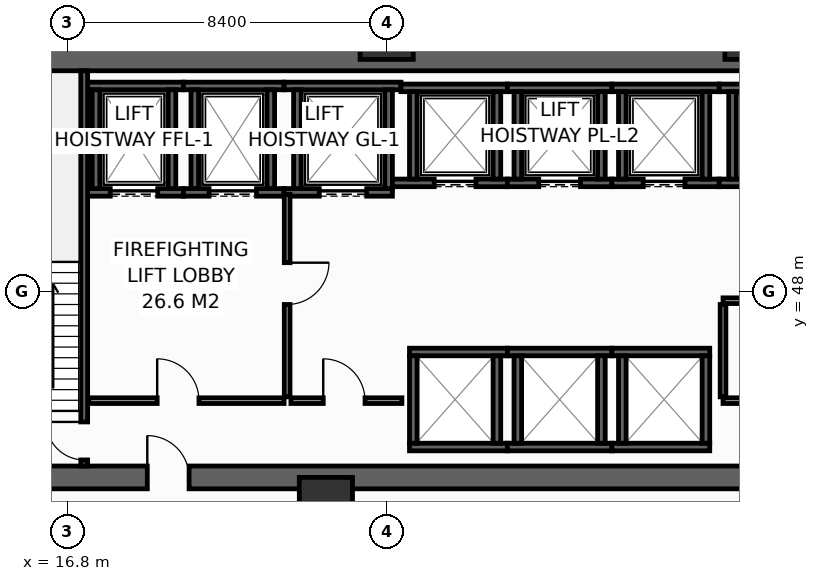
"""IFC4 building model, lengths in metres.
Left out: names, types, materials, properties, quantities, classifications, styles, units other than length and angle.
Written with IfcOpenShell. Run it as: python <this file> out.ifc"""

import sys

from ifc_helpers import new_model, si_unit, direction, frame, frame_2d, origin, origin_2d, place, context, subcontext, project, spatial, rectangle, hollow_rectangle, extrude, element, fill, save


model = new_model("IFC4")
c1 = context("Model", 3, precision=1e-05, world=origin(), true_north=direction((0.0, 1.0)))
c2 = subcontext(c1, "Body", "Model", "MODEL_VIEW")
j1 = project(units=[si_unit("LENGTHUNIT", "METRE"), si_unit("PLANEANGLEUNIT", "RADIAN")], contexts=[c1])
p1 = place(None, origin())
s1 = spatial("IfcSite", under=j1, at=p1, CompositionType="ELEMENT")
p2 = place(p1, origin())
s2 = spatial("IfcBuilding", under=s1, at=p2, CompositionType="ELEMENT")
p3 = place(p2, frame((0.0, 0.0, 6.0)))
s3 = spatial("IfcBuildingStorey", under=s2, at=p3, CompositionType="ELEMENT", Elevation=6.0)
p4 = place(p3, frame((13.5, 43.1, 0.0), z_axis=(0.0, 0.0, 1.0), x_axis=(1.0, 0.0, 0.0)))
e1 = element("IfcWall", 1, at=p4, inside=s3, PredefinedType="SHEAR", context=c2, shape_type="SweptSolid", body=[
    extrude(rectangle(XDim=32.9, YDim=0.6, at=frame_2d((16.45, 0.0))), origin(), (0.0, 0.0, 1.0), 5.1),
])
p5 = place(p4, frame((5.4, 0.0, 0.0)))
e2 = element("IfcOpeningElement", 2, at=p5, cuts=e1, PredefinedType="OPENING", context=c2, shape_type="SweptSolid", body=[
    extrude(rectangle(XDim=1.1, YDim=2.15, at=frame_2d((0.55, 1.075))), frame((0.0, 0.31, 0.0), z_axis=(0.0, -1.0, 0.0), x_axis=(1.0, 0.0, 0.0)), (0.0, 0.0, 1.0), 0.62),
])
p6 = place(p4, frame((25.6, 0.0, 0.0)))
e3 = element("IfcOpeningElement", 3, at=p6, cuts=e1, PredefinedType="OPENING", context=c2, shape_type="SweptSolid", body=[
    extrude(rectangle(XDim=1.1, YDim=2.15, at=frame_2d((0.55, 1.075))), frame((0.0, 0.31, 0.0), z_axis=(0.0, -1.0, 0.0), x_axis=(1.0, 0.0, 0.0)), (0.0, 0.0, 1.0), 0.62),
])
p7 = place(p3, frame((13.5, 54.1, 0.0), z_axis=(0.0, 0.0, 1.0), x_axis=(1.0, 0.0, 0.0)))
e4 = element("IfcWall", 4, at=p7, inside=s3, PredefinedType="SHEAR", context=c2, shape_type="SweptSolid", body=[
    extrude(rectangle(XDim=32.9, YDim=0.6, at=frame_2d((16.45, 0.0))), origin(), (0.0, 0.0, 1.0), 5.1),
])
for number, where, z_axis, x_axis in (
    (5, (25.2, 54.8, 0.0), (0.0, 0.0, 1.0), (1.0, 0.0, 0.0)),
    (6, (34.8, 54.8, 0.0), (0.0, 0.0, 1.0), (1.0, 0.0, 0.0)),
    (7, (23.6, 42.4, 0.0), (0.0, 0.0, 1.0), (1.0, 0.0, 0.0)),
):
    element("IfcColumn", number, at=place(p3, frame(where, z_axis=z_axis, x_axis=x_axis)), inside=s3, PredefinedType="COLUMN", context=c2, shape_type="SweptSolid", body=[
        extrude(hollow_rectangle(XDim=1.4, YDim=1.4, WallThickness=0.065, at=origin_2d()), origin(), (0.0, 0.0, 1.0), 5.4),
    ])
p8 = place(p3, frame((17.33, 50.6, 0.0), z_axis=(0.0, 0.0, 1.0), x_axis=(1.0, 0.0, 0.0)))
e8 = element("IfcWall", 8, at=p8, inside=s3, PredefinedType="SHEAR", context=c2, shape_type="SweptSolid", body=[
    extrude(rectangle(XDim=2.52, YDim=0.2, at=frame_2d((1.26, 0.0))), origin(), (0.0, 0.0, 1.0), 5.1),
])
p9 = place(p8, frame((0.595, 0.0, 0.0)))
e9 = element("IfcOpeningElement", 9, at=p9, cuts=e8, PredefinedType="OPENING", context=c2, shape_type="SweptSolid", body=[
    extrude(rectangle(XDim=1.25, YDim=2.3, at=frame_2d((0.625, 1.15))), frame((0.0, 0.11, 0.0), z_axis=(0.0, -1.0, 0.0), x_axis=(1.0, 0.0, 0.0)), (0.0, 0.0, 1.0), 0.22),
])
p10 = place(p3, frame((17.33, 53.4, 0.0), z_axis=(0.0, 0.0, 1.0), x_axis=(1.0, 0.0, 0.0)))
e10 = element("IfcWall", 10, at=p10, inside=s3, PredefinedType="SHEAR", context=c2, shape_type="SweptSolid", body=[
    extrude(rectangle(XDim=2.52, YDim=0.2, at=frame_2d((1.26, 0.0))), origin(), (0.0, 0.0, 1.0), 5.1),
])
for number, where, z_axis, x_axis in (
    (11, (17.55, 50.7, 0.0), (0.0, 0.0, 1.0), (0.0, 1.0, 0.0)),
    (12, (19.55, 50.7, 0.0), (0.0, 0.0, 1.0), (0.0, 1.0, 0.0)),
):
    element("IfcWall", number, at=place(p3, frame(where, z_axis=z_axis, x_axis=x_axis)), inside=s3, PredefinedType="SHEAR", context=c2, shape_type="SweptSolid", body=[
        extrude(rectangle(XDim=2.6, YDim=0.2, at=frame_2d((1.3, 0.0))), origin(), (0.0, 0.0, 1.0), 5.1),
    ])
p11 = place(p3, frame((19.85, 50.6, 0.0), z_axis=(0.0, 0.0, 1.0), x_axis=(1.0, 0.0, 0.0)))
e13 = element("IfcWall", 13, at=p11, inside=s3, PredefinedType="SHEAR", context=c2, shape_type="SweptSolid", body=[
    extrude(rectangle(XDim=2.65, YDim=0.2, at=frame_2d((1.325, 0.0))), origin(), (0.0, 0.0, 1.0), 5.1),
])
p12 = place(p11, frame((0.675, 0.0, 0.0)))
e14 = element("IfcOpeningElement", 14, at=p12, cuts=e13, PredefinedType="OPENING", context=c2, shape_type="SweptSolid", body=[
    extrude(rectangle(XDim=1.25, YDim=2.3, at=frame_2d((0.625, 1.15))), frame((0.0, 0.11, 0.0), z_axis=(0.0, -1.0, 0.0), x_axis=(1.0, 0.0, 0.0)), (0.0, 0.0, 1.0), 0.22),
])
p13 = place(p3, frame((19.85, 53.4, 0.0), z_axis=(0.0, 0.0, 1.0), x_axis=(1.0, 0.0, 0.0)))
e15 = element("IfcWall", 15, at=p13, inside=s3, PredefinedType="SHEAR", context=c2, shape_type="SweptSolid", body=[
    extrude(rectangle(XDim=2.65, YDim=0.2, at=frame_2d((1.325, 0.0))), origin(), (0.0, 0.0, 1.0), 5.1),
])
for number, where, z_axis, x_axis in (
    (16, (20.15, 50.7, 0.0), (0.0, 0.0, 1.0), (0.0, 1.0, 0.0)),
    (17, (22.15, 50.7, 0.0), (0.0, 0.0, 1.0), (0.0, 1.0, 0.0)),
):
    element("IfcWall", number, at=place(p3, frame(where, z_axis=z_axis, x_axis=x_axis)), inside=s3, PredefinedType="SHEAR", context=c2, shape_type="SweptSolid", body=[
        extrude(rectangle(XDim=2.6, YDim=0.2, at=frame_2d((1.3, 0.0))), origin(), (0.0, 0.0, 1.0), 5.1),
    ])
p14 = place(p3, frame((22.5, 50.6, 0.0), z_axis=(0.0, 0.0, 1.0), x_axis=(1.0, 0.0, 0.0)))
e18 = element("IfcWall", 18, at=p14, inside=s3, PredefinedType="SHEAR", context=c2, shape_type="SweptSolid", body=[
    extrude(rectangle(XDim=2.85, YDim=0.2, at=frame_2d((1.425, 0.0))), origin(), (0.0, 0.0, 1.0), 5.1),
])
p15 = place(p14, frame((0.925, 0.0, 0.0)))
e19 = element("IfcOpeningElement", 19, at=p15, cuts=e18, PredefinedType="OPENING", context=c2, shape_type="SweptSolid", body=[
    extrude(rectangle(XDim=1.25, YDim=2.3, at=frame_2d((0.625, 1.15))), frame((0.0, 0.11, 0.0), z_axis=(0.0, -1.0, 0.0), x_axis=(1.0, 0.0, 0.0)), (0.0, 0.0, 1.0), 0.22),
])
p16 = place(p3, frame((22.5, 53.4, 0.0), z_axis=(0.0, 0.0, 1.0), x_axis=(1.0, 0.0, 0.0)))
e20 = element("IfcWall", 20, at=p16, inside=s3, PredefinedType="SHEAR", context=c2, shape_type="SweptSolid", body=[
    extrude(rectangle(XDim=3.075, YDim=0.2, at=frame_2d((1.538, 0.0))), origin(), (0.0, 0.0, 1.0), 5.1),
])
for number, where, z_axis, x_axis in (
    (21, (22.85, 50.7, 0.0), (0.0, 0.0, 1.0), (0.0, 1.0, 0.0)),
    (22, (25.25, 50.7, 0.0), (0.0, 0.0, 1.0), (0.0, 1.0, 0.0)),
):
    element("IfcWall", number, at=place(p3, frame(where, z_axis=z_axis, x_axis=x_axis)), inside=s3, PredefinedType="SHEAR", context=c2, shape_type="SweptSolid", body=[
        extrude(rectangle(XDim=2.6, YDim=0.2, at=frame_2d((1.3, 0.0))), origin(), (0.0, 0.0, 1.0), 5.1),
    ])
p17 = place(p3, frame((25.35, 50.85, 0.0), z_axis=(0.0, 0.0, 1.0), x_axis=(1.0, 0.0, 0.0)))
e23 = element("IfcWall", 23, at=p17, inside=s3, PredefinedType="SHEAR", context=c2, shape_type="SweptSolid", body=[
    extrude(rectangle(XDim=3.025, YDim=0.2, at=frame_2d((1.512, 0.0))), origin(), (0.0, 0.0, 1.0), 5.1),
])
p18 = place(p17, frame((1.1, 0.0, 0.0)))
e24 = element("IfcOpeningElement", 24, at=p18, cuts=e23, PredefinedType="OPENING", context=c2, shape_type="SweptSolid", body=[
    extrude(rectangle(XDim=1.1, YDim=2.2, at=frame_2d((0.55, 1.1))), frame((0.0, 0.11, 0.0), z_axis=(0.0, -1.0, 0.0), x_axis=(1.0, 0.0, 0.0)), (0.0, 0.0, 1.0), 0.22),
])
p19 = place(p3, frame((25.575, 53.35, 0.0), z_axis=(0.0, 0.0, 1.0), x_axis=(1.0, 0.0, 0.0)))
e25 = element("IfcWall", 25, at=p19, inside=s3, PredefinedType="SHEAR", context=c2, shape_type="SweptSolid", body=[
    extrude(rectangle(XDim=2.8, YDim=0.2, at=frame_2d((1.4, 0.0))), origin(), (0.0, 0.0, 1.0), 5.1),
])
for number, where, z_axis, x_axis in (
    (26, (25.9, 50.95, 0.0), (0.0, 0.0, 1.0), (0.0, 1.0, 0.0)),
    (27, (28.1, 50.95, 0.0), (0.0, 0.0, 1.0), (0.0, 1.0, 0.0)),
):
    element("IfcWall", number, at=place(p3, frame(where, z_axis=z_axis, x_axis=x_axis)), inside=s3, PredefinedType="SHEAR", context=c2, shape_type="SweptSolid", body=[
        extrude(rectangle(XDim=2.3, YDim=0.2, at=frame_2d((1.15, 0.0))), origin(), (0.0, 0.0, 1.0), 5.1),
    ])
p20 = place(p3, frame((28.375, 50.85, 0.0), z_axis=(0.0, 0.0, 1.0), x_axis=(1.0, 0.0, 0.0)))
e28 = element("IfcWall", 28, at=p20, inside=s3, PredefinedType="SHEAR", context=c2, shape_type="SweptSolid", body=[
    extrude(rectangle(XDim=2.75, YDim=0.2, at=frame_2d((1.375, 0.0))), origin(), (0.0, 0.0, 1.0), 5.1),
])
p21 = place(p20, frame((0.825, 0.0, 0.0)))
e29 = element("IfcOpeningElement", 29, at=p21, cuts=e28, PredefinedType="OPENING", context=c2, shape_type="SweptSolid", body=[
    extrude(rectangle(XDim=1.1, YDim=2.2, at=frame_2d((0.55, 1.1))), frame((0.0, 0.11, 0.0), z_axis=(0.0, -1.0, 0.0), x_axis=(1.0, 0.0, 0.0)), (0.0, 0.0, 1.0), 0.22),
])
p22 = place(p3, frame((28.375, 53.35, 0.0), z_axis=(0.0, 0.0, 1.0), x_axis=(1.0, 0.0, 0.0)))
e30 = element("IfcWall", 30, at=p22, inside=s3, PredefinedType="SHEAR", context=c2, shape_type="SweptSolid", body=[
    extrude(rectangle(XDim=2.75, YDim=0.2, at=frame_2d((1.375, 0.0))), origin(), (0.0, 0.0, 1.0), 5.1),
])
for number, where, z_axis, x_axis in (
    (31, (28.65, 50.95, 0.0), (0.0, 0.0, 1.0), (0.0, 1.0, 0.0)),
    (32, (30.85, 50.95, 0.0), (0.0, 0.0, 1.0), (0.0, 1.0, 0.0)),
):
    element("IfcWall", number, at=place(p3, frame(where, z_axis=z_axis, x_axis=x_axis)), inside=s3, PredefinedType="SHEAR", context=c2, shape_type="SweptSolid", body=[
        extrude(rectangle(XDim=2.3, YDim=0.2, at=frame_2d((1.15, 0.0))), origin(), (0.0, 0.0, 1.0), 5.1),
    ])
p23 = place(p3, frame((31.125, 50.85, 0.0), z_axis=(0.0, 0.0, 1.0), x_axis=(1.0, 0.0, 0.0)))
e33 = element("IfcWall", 33, at=p23, inside=s3, PredefinedType="SHEAR", context=c2, shape_type="SweptSolid", body=[
    extrude(rectangle(XDim=2.825, YDim=0.2, at=frame_2d((1.413, 0.0))), origin(), (0.0, 0.0, 1.0), 5.1),
])
p24 = place(p23, frame((0.825, 0.0, 0.0)))
e34 = element("IfcOpeningElement", 34, at=p24, cuts=e33, PredefinedType="OPENING", context=c2, shape_type="SweptSolid", body=[
    extrude(rectangle(XDim=1.1, YDim=2.2, at=frame_2d((0.55, 1.1))), frame((0.0, 0.11, 0.0), z_axis=(0.0, -1.0, 0.0), x_axis=(1.0, 0.0, 0.0)), (0.0, 0.0, 1.0), 0.22),
])
p25 = place(p3, frame((31.125, 53.35, 0.0), z_axis=(0.0, 0.0, 1.0), x_axis=(1.0, 0.0, 0.0)))
e35 = element("IfcWall", 35, at=p25, inside=s3, PredefinedType="SHEAR", context=c2, shape_type="SweptSolid", body=[
    extrude(rectangle(XDim=2.825, YDim=0.2, at=frame_2d((1.413, 0.0))), origin(), (0.0, 0.0, 1.0), 5.1),
])
for number, where, z_axis, x_axis in (
    (36, (31.4, 50.95, 0.0), (0.0, 0.0, 1.0), (0.0, 1.0, 0.0)),
    (37, (33.6, 50.95, 0.0), (0.0, 0.0, 1.0), (0.0, 1.0, 0.0)),
):
    element("IfcWall", number, at=place(p3, frame(where, z_axis=z_axis, x_axis=x_axis)), inside=s3, PredefinedType="SHEAR", context=c2, shape_type="SweptSolid", body=[
        extrude(rectangle(XDim=2.3, YDim=0.2, at=frame_2d((1.15, 0.0))), origin(), (0.0, 0.0, 1.0), 5.1),
    ])
for number, where, z_axis, x_axis in (
    (38, (25.8, 43.9, 0.0), (0.0, 0.0, 1.0), (1.0, 0.0, 0.0)),
    (39, (25.8, 46.4, 0.0), (0.0, 0.0, 1.0), (1.0, 0.0, 0.0)),
):
    element("IfcWall", number, at=place(p3, frame(where, z_axis=z_axis, x_axis=x_axis)), inside=s3, PredefinedType="SHEAR", context=c2, shape_type="SweptSolid", body=[
        extrude(rectangle(XDim=2.575, YDim=0.2, at=frame_2d((1.288, 0.0))), origin(), (0.0, 0.0, 1.0), 5.1),
    ])
for number, where, z_axis, x_axis in (
    (40, (25.9, 44.0, 0.0), (0.0, 0.0, 1.0), (0.0, 1.0, 0.0)),
    (41, (28.1, 44.0, 0.0), (0.0, 0.0, 1.0), (0.0, 1.0, 0.0)),
):
    element("IfcWall", number, at=place(p3, frame(where, z_axis=z_axis, x_axis=x_axis)), inside=s3, PredefinedType="SHEAR", context=c2, shape_type="SweptSolid", body=[
        extrude(rectangle(XDim=2.3, YDim=0.2, at=frame_2d((1.15, 0.0))), origin(), (0.0, 0.0, 1.0), 5.1),
    ])
for number, where, z_axis, x_axis in (
    (42, (28.375, 43.9, 0.0), (0.0, 0.0, 1.0), (1.0, 0.0, 0.0)),
    (43, (28.375, 46.4, 0.0), (0.0, 0.0, 1.0), (1.0, 0.0, 0.0)),
):
    element("IfcWall", number, at=place(p3, frame(where, z_axis=z_axis, x_axis=x_axis)), inside=s3, PredefinedType="SHEAR", context=c2, shape_type="SweptSolid", body=[
        extrude(rectangle(XDim=2.75, YDim=0.2, at=frame_2d((1.375, 0.0))), origin(), (0.0, 0.0, 1.0), 5.1),
    ])
for number, where, z_axis, x_axis in (
    (44, (28.65, 44.0, 0.0), (0.0, 0.0, 1.0), (0.0, 1.0, 0.0)),
    (45, (30.85, 44.0, 0.0), (0.0, 0.0, 1.0), (0.0, 1.0, 0.0)),
):
    element("IfcWall", number, at=place(p3, frame(where, z_axis=z_axis, x_axis=x_axis)), inside=s3, PredefinedType="SHEAR", context=c2, shape_type="SweptSolid", body=[
        extrude(rectangle(XDim=2.3, YDim=0.2, at=frame_2d((1.15, 0.0))), origin(), (0.0, 0.0, 1.0), 5.1),
    ])
for number, where, z_axis, x_axis in (
    (46, (31.125, 43.9, 0.0), (0.0, 0.0, 1.0), (1.0, 0.0, 0.0)),
    (47, (31.125, 46.4, 0.0), (0.0, 0.0, 1.0), (1.0, 0.0, 0.0)),
):
    element("IfcWall", number, at=place(p3, frame(where, z_axis=z_axis, x_axis=x_axis)), inside=s3, PredefinedType="SHEAR", context=c2, shape_type="SweptSolid", body=[
        extrude(rectangle(XDim=2.575, YDim=0.2, at=frame_2d((1.288, 0.0))), origin(), (0.0, 0.0, 1.0), 5.1),
    ])
for number, where, z_axis, x_axis in (
    (48, (31.4, 44.0, 0.0), (0.0, 0.0, 1.0), (0.0, 1.0, 0.0)),
    (49, (33.6, 44.0, 0.0), (0.0, 0.0, 1.0), (0.0, 1.0, 0.0)),
):
    element("IfcWall", number, at=place(p3, frame(where, z_axis=z_axis, x_axis=x_axis)), inside=s3, PredefinedType="SHEAR", context=c2, shape_type="SweptSolid", body=[
        extrude(rectangle(XDim=2.3, YDim=0.2, at=frame_2d((1.15, 0.0))), origin(), (0.0, 0.0, 1.0), 5.1),
    ])
for number, where, z_axis, x_axis in (
    (50, (33.95, 50.85, 0.0), (0.0, 0.0, 1.0), (1.0, 0.0, 0.0)),
    (51, (33.95, 53.35, 0.0), (0.0, 0.0, 1.0), (1.0, 0.0, 0.0)),
):
    element("IfcWall", number, at=place(p3, frame(where, z_axis=z_axis, x_axis=x_axis)), inside=s3, PredefinedType="SHEAR", context=c2, shape_type="SweptSolid", body=[
        extrude(rectangle(XDim=2.825, YDim=0.2, at=frame_2d((1.413, 0.0))), origin(), (0.0, 0.0, 1.0), 5.1),
    ])
p26 = place(p3, frame((34.3, 50.95, 0.0), z_axis=(0.0, 0.0, 1.0), x_axis=(0.0, 1.0, 0.0)))
e52 = element("IfcWall", 52, at=p26, inside=s3, PredefinedType="SHEAR", context=c2, shape_type="SweptSolid", body=[
    extrude(rectangle(XDim=2.3, YDim=0.2, at=frame_2d((1.15, 0.0))), origin(), (0.0, 0.0, 1.0), 5.1),
])
p27 = place(p3, frame((17.24, 43.4, 0.0), z_axis=(0.0, 0.0, 1.0), x_axis=(0.0, 1.0, 0.0)))
e53 = element("IfcWall", 53, at=p27, inside=s3, PredefinedType="SHEAR", context=c2, shape_type="SweptSolid", body=[
    extrude(rectangle(XDim=10.4, YDim=0.18, at=frame_2d((5.2, 0.0))), origin(), (0.0, 0.0, 1.0), 5.1),
])
p28 = place(p27, frame((0.16, 0.0, 0.0)))
e54 = element("IfcOpeningElement", 54, at=p28, cuts=e53, PredefinedType="OPENING", context=c2, shape_type="SweptSolid", body=[
    extrude(rectangle(XDim=1.0, YDim=2.15, at=frame_2d((0.5, 1.075))), frame((0.0, 0.1, 0.0), z_axis=(0.0, -1.0, 0.0), x_axis=(1.0, 0.0, 0.0)), (0.0, 0.0, 1.0), 0.2),
])
p29 = place(p3, frame((17.36, 45.12, 0.0), z_axis=(0.0, 0.0, 1.0), x_axis=(1.0, 0.0, 0.0)))
e55 = element("IfcWall", 55, at=p29, inside=s3, PredefinedType="PARTITIONING", context=c2, shape_type="SweptSolid", body=[
    extrude(rectangle(XDim=5.14, YDim=0.15, at=frame_2d((2.57, 0.0))), origin(), (0.0, 0.0, 1.0), 5.1),
])
p30 = place(p29, frame((1.8, 0.0, 0.0)))
e56 = element("IfcOpeningElement", 56, at=p30, cuts=e55, PredefinedType="OPENING", context=c2, shape_type="SweptSolid", body=[
    extrude(rectangle(XDim=1.1, YDim=2.15, at=frame_2d((0.55, 1.075))), frame((0.0, 0.085, 0.0), z_axis=(0.0, -1.0, 0.0), x_axis=(1.0, 0.0, 0.0)), (0.0, 0.0, 1.0), 0.17),
])
p31 = place(p3, frame((22.58, 50.55, 0.0), z_axis=(0.0, 0.0, 1.0), x_axis=(0.0, -1.0, 0.0)))
e57 = element("IfcWall", 57, at=p31, inside=s3, PredefinedType="PARTITIONING", context=c2, shape_type="SweptSolid", body=[
    extrude(rectangle(XDim=5.33, YDim=0.15, at=frame_2d((2.665, 0.0))), origin(), (0.0, 0.0, 1.0), 5.1),
])
p32 = place(p31, frame((1.8, 0.0, 0.0)))
e58 = element("IfcOpeningElement", 58, at=p32, cuts=e57, PredefinedType="OPENING", context=c2, shape_type="SweptSolid", body=[
    extrude(rectangle(XDim=1.1, YDim=2.15, at=frame_2d((0.55, 1.075))), frame((0.0, 0.085, 0.0), z_axis=(0.0, -1.0, 0.0), x_axis=(1.0, 0.0, 0.0)), (0.0, 0.0, 1.0), 0.17),
])
p33 = place(p3, frame((22.68, 45.12, 0.0), z_axis=(0.0, 0.0, 1.0), x_axis=(1.0, 0.0, 0.0)))
e59 = element("IfcWall", 59, at=p33, inside=s3, PredefinedType="PARTITIONING", context=c2, shape_type="SweptSolid", body=[
    extrude(rectangle(XDim=2.92, YDim=0.15, at=frame_2d((1.46, 0.0))), origin(), (0.0, 0.0, 1.0), 5.1),
])
p34 = place(p33, frame((0.85, 0.0, 0.0)))
e60 = element("IfcOpeningElement", 60, at=p34, cuts=e59, PredefinedType="OPENING", context=c2, shape_type="SweptSolid", body=[
    extrude(rectangle(XDim=1.1, YDim=2.15, at=frame_2d((0.55, 1.075))), frame((0.0, 0.085, 0.0), z_axis=(0.0, -1.0, 0.0), x_axis=(1.0, 0.0, 0.0)), (0.0, 0.0, 1.0), 0.17),
])
p35 = place(p3, frame((34.05, 45.12, 0.0), z_axis=(0.0, 0.0, 1.0), x_axis=(1.0, 0.0, 0.0)))
e61 = element("IfcWall", 61, at=p35, inside=s3, PredefinedType="PARTITIONING", context=c2, shape_type="SweptSolid", body=[
    extrude(rectangle(XDim=8.45, YDim=0.15, at=frame_2d((4.225, 0.0))), origin(), (0.0, 0.0, 1.0), 5.1),
])
p36 = place(p35, frame((3.6, 0.0, 0.0)))
e62 = element("IfcOpeningElement", 62, at=p36, cuts=e61, PredefinedType="OPENING", context=c2, shape_type="SweptSolid", body=[
    extrude(rectangle(XDim=0.95, YDim=2.15, at=frame_2d((0.475, 1.075))), frame((0.0, 0.085, 0.0), z_axis=(0.0, -1.0, 0.0), x_axis=(1.0, 0.0, 0.0)), (0.0, 0.0, 1.0), 0.17),
])
p37 = place(p3, frame((34.05, 47.75, 0.0), z_axis=(0.0, 0.0, 1.0), x_axis=(1.0, 0.0, 0.0)))
e63 = element("IfcWall", 63, at=p37, inside=s3, PredefinedType="PARTITIONING", context=c2, shape_type="SweptSolid", body=[
    extrude(rectangle(XDim=8.45, YDim=0.15, at=frame_2d((4.225, 0.0))), origin(), (0.0, 0.0, 1.0), 5.1),
])
p38 = place(p3, frame((34.05, 45.22, 0.0), z_axis=(0.0, 0.0, 1.0), x_axis=(0.0, 1.0, 0.0)))
e64 = element("IfcWall", 64, at=p38, inside=s3, PredefinedType="PARTITIONING", context=c2, shape_type="SweptSolid", body=[
    extrude(rectangle(XDim=2.43, YDim=0.15, at=frame_2d((1.215, 0.0))), origin(), (0.0, 0.0, 1.0), 5.1),
])
p39 = place(p9, origin())
e65 = element("IfcDoor", 65, at=p39, inside=s3, OperationType="SLIDING_TO_LEFT", PredefinedType="DOOR", context=c2, shape_type="SweptSolid", body=[
    extrude(rectangle(XDim=1.25, YDim=2.3, at=frame_2d((0.625, 1.15))), frame((0.0, 0.025, 0.0), z_axis=(0.0, -1.0, 0.0), x_axis=(1.0, 0.0, 0.0)), (0.0, 0.0, 1.0), 0.05),
])
fill(e9, e65)
p40 = place(p12, origin())
e66 = element("IfcDoor", 66, at=p40, inside=s3, OperationType="SLIDING_TO_LEFT", PredefinedType="DOOR", context=c2, shape_type="SweptSolid", body=[
    extrude(rectangle(XDim=1.25, YDim=2.3, at=frame_2d((0.625, 1.15))), frame((0.0, 0.025, 0.0), z_axis=(0.0, -1.0, 0.0), x_axis=(1.0, 0.0, 0.0)), (0.0, 0.0, 1.0), 0.05),
])
fill(e14, e66)
p41 = place(p15, origin())
e67 = element("IfcDoor", 67, at=p41, inside=s3, OperationType="SLIDING_TO_LEFT", PredefinedType="DOOR", context=c2, shape_type="SweptSolid", body=[
    extrude(rectangle(XDim=1.25, YDim=2.3, at=frame_2d((0.625, 1.15))), frame((0.0, 0.025, 0.0), z_axis=(0.0, -1.0, 0.0), x_axis=(1.0, 0.0, 0.0)), (0.0, 0.0, 1.0), 0.05),
])
fill(e19, e67)
p42 = place(p18, origin())
e68 = element("IfcDoor", 68, at=p42, inside=s3, OperationType="SLIDING_TO_LEFT", PredefinedType="DOOR", context=c2, shape_type="SweptSolid", body=[
    extrude(rectangle(XDim=1.1, YDim=2.2, at=frame_2d((0.55, 1.1))), frame((0.0, 0.025, 0.0), z_axis=(0.0, -1.0, 0.0), x_axis=(1.0, 0.0, 0.0)), (0.0, 0.0, 1.0), 0.05),
])
fill(e24, e68)
p43 = place(p21, origin())
e69 = element("IfcDoor", 69, at=p43, inside=s3, OperationType="SLIDING_TO_LEFT", PredefinedType="DOOR", context=c2, shape_type="SweptSolid", body=[
    extrude(rectangle(XDim=1.1, YDim=2.2, at=frame_2d((0.55, 1.1))), frame((0.0, 0.025, 0.0), z_axis=(0.0, -1.0, 0.0), x_axis=(1.0, 0.0, 0.0)), (0.0, 0.0, 1.0), 0.05),
])
fill(e29, e69)
p44 = place(p24, origin())
e70 = element("IfcDoor", 70, at=p44, inside=s3, OperationType="SLIDING_TO_LEFT", PredefinedType="DOOR", context=c2, shape_type="SweptSolid", body=[
    extrude(rectangle(XDim=1.1, YDim=2.2, at=frame_2d((0.55, 1.1))), frame((0.0, 0.025, 0.0), z_axis=(0.0, -1.0, 0.0), x_axis=(1.0, 0.0, 0.0)), (0.0, 0.0, 1.0), 0.05),
])
fill(e34, e70)
p45 = place(p28, origin())
e71 = element("IfcDoor", 71, at=p45, inside=s3, OperationType="SINGLE_SWING_RIGHT", PredefinedType="DOOR", context=c2, shape_type="SweptSolid", body=[
    extrude(rectangle(XDim=1.0, YDim=2.15, at=frame_2d((0.5, 1.075))), frame((0.0, 0.025, 0.0), z_axis=(0.0, -1.0, 0.0), x_axis=(1.0, 0.0, 0.0)), (0.0, 0.0, 1.0), 0.05),
])
fill(e54, e71)
p46 = place(p30, origin())
e72 = element("IfcDoor", 72, at=p46, inside=s3, OperationType="SINGLE_SWING_LEFT", PredefinedType="DOOR", context=c2, shape_type="SweptSolid", body=[
    extrude(rectangle(XDim=1.1, YDim=2.15, at=frame_2d((0.55, 1.075))), frame((0.0, 0.025, 0.0), z_axis=(0.0, -1.0, 0.0), x_axis=(1.0, 0.0, 0.0)), (0.0, 0.0, 1.0), 0.05),
])
fill(e56, e72)
p47 = place(p32, origin())
e73 = element("IfcDoor", 73, at=p47, inside=s3, OperationType="SINGLE_SWING_LEFT", PredefinedType="DOOR", context=c2, shape_type="SweptSolid", body=[
    extrude(rectangle(XDim=1.1, YDim=2.15, at=frame_2d((0.55, 1.075))), frame((0.0, 0.025, 0.0), z_axis=(0.0, -1.0, 0.0), x_axis=(1.0, 0.0, 0.0)), (0.0, 0.0, 1.0), 0.05),
])
fill(e58, e73)
p48 = place(p34, origin())
e74 = element("IfcDoor", 74, at=p48, inside=s3, OperationType="SINGLE_SWING_LEFT", PredefinedType="DOOR", context=c2, shape_type="SweptSolid", body=[
    extrude(rectangle(XDim=1.1, YDim=2.15, at=frame_2d((0.55, 1.075))), frame((0.0, 0.025, 0.0), z_axis=(0.0, -1.0, 0.0), x_axis=(1.0, 0.0, 0.0)), (0.0, 0.0, 1.0), 0.05),
])
fill(e60, e74)
p49 = place(p5, origin())
e75 = element("IfcDoor", 75, at=p49, inside=s3, OperationType="SINGLE_SWING_LEFT", PredefinedType="DOOR", context=c2, shape_type="SweptSolid", body=[
    extrude(rectangle(XDim=1.1, YDim=2.15, at=frame_2d((0.55, 1.075))), frame((0.0, 0.025, 0.0), z_axis=(0.0, -1.0, 0.0), x_axis=(1.0, 0.0, 0.0)), (0.0, 0.0, 1.0), 0.05),
])
fill(e2, e75)
save(model, sys.argv[1])
